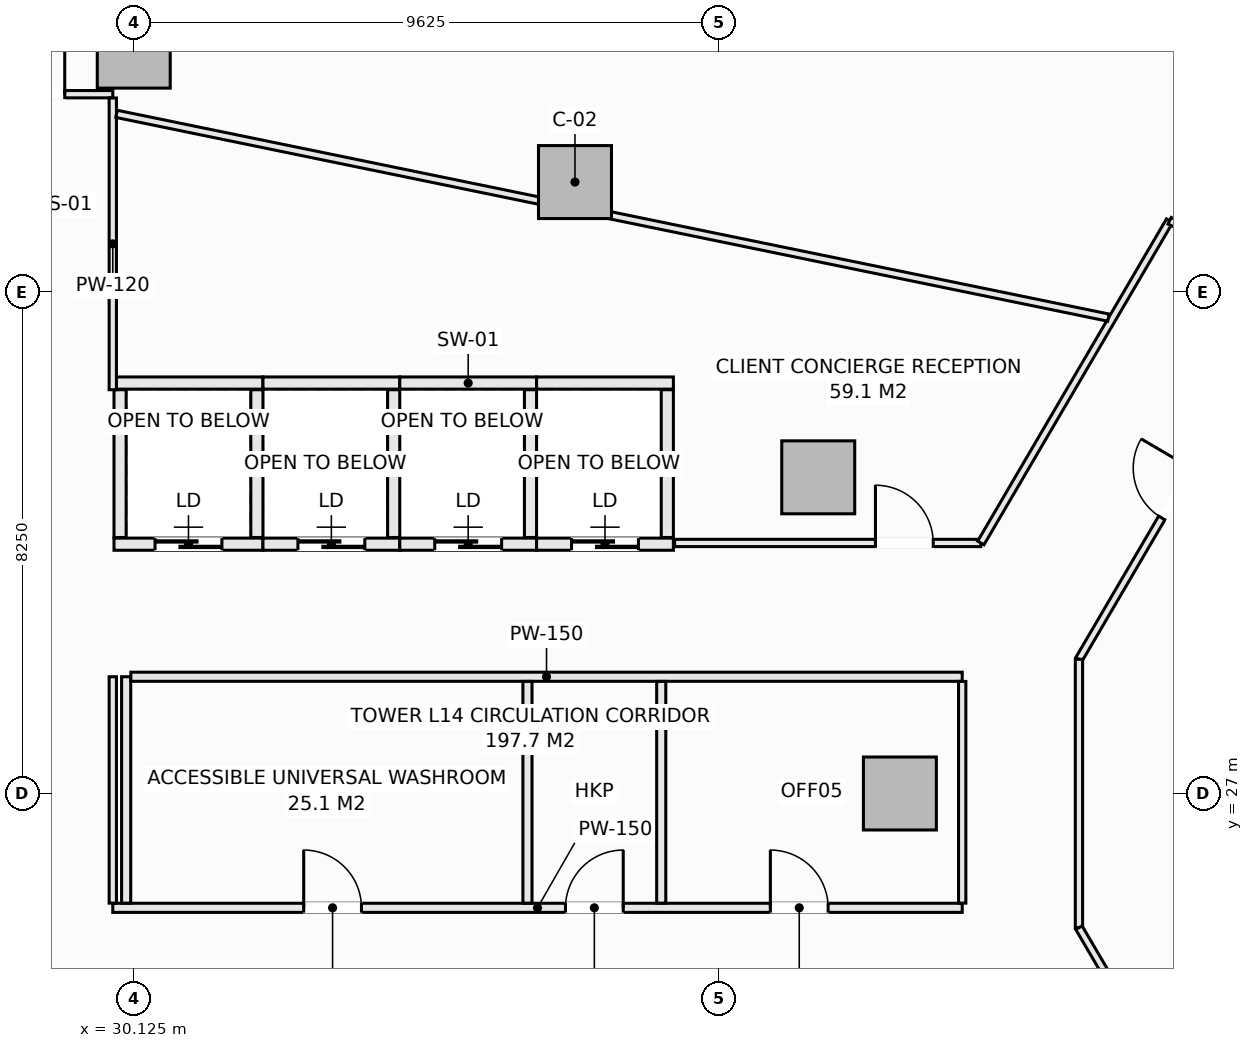
"""IFC4 building model, lengths in metres.
Left out: names, types, materials, properties, quantities, classifications, styles, units other than length and angle.
Written with IfcOpenShell. Run it as: python <this file> out.ifc"""

import sys

from ifc_helpers import new_model, si_unit, direction, frame, frame_2d, origin, origin_2d, place, context, subcontext, project, spatial, rectangle, extrude, element, fill, save


model = new_model("IFC4")
c1 = context("Model", 3, precision=1e-05, world=origin(), true_north=direction((0.0, 1.0)))
c2 = subcontext(c1, "Body", "Model", "MODEL_VIEW")
j1 = project(units=[si_unit("LENGTHUNIT", "METRE"), si_unit("PLANEANGLEUNIT", "RADIAN")], contexts=[c1])
p1 = place(None, origin())
s1 = spatial("IfcSite", under=j1, at=p1, CompositionType="ELEMENT")
p2 = place(p1, origin())
s2 = spatial("IfcBuilding", under=s1, at=p2, CompositionType="ELEMENT")
p3 = place(p2, frame((0.0, 0.0, 61.15)))
s3 = spatial("IfcBuildingStorey", under=s2, at=p3, CompositionType="ELEMENT", Elevation=61.15)
for number, where, z_axis, x_axis in (
    (1, (42.725, 27.0, -0.28), (0.0, 0.0, 1.0), (1.0, 0.0, 0.0)),
    (2, (41.382, 32.199, -0.28), (0.0, 0.0, 1.0), (1.0, 0.0, 0.0)),
    (3, (37.382, 37.055, -0.28), (0.0, 0.0, 1.0), (1.0, 0.0, 0.0)),
    (4, (30.125, 39.2, -0.28), (0.0, 0.0, 1.0), (1.0, 0.0, 0.0)),
):
    element("IfcColumn", number, at=place(p3, frame(where, z_axis=z_axis, x_axis=x_axis)), inside=s3, PredefinedType="COLUMN", context=c2, shape_type="SweptSolid", body=[
        extrude(rectangle(XDim=1.2, YDim=1.2, at=origin_2d()), origin(), (0.0, 0.0, 1.0), 3.85),
    ])
p4 = place(p3, frame((29.8, 33.75, 0.0), z_axis=(0.0, 0.0, 1.0), x_axis=(1.0, 0.0, 0.0)))
e5 = element("IfcWall", 5, at=p4, inside=s3, PredefinedType="SOLIDWALL", context=c2, shape_type="SweptSolid", body=[
    extrude(rectangle(XDim=2.45, YDim=0.2, at=frame_2d((1.225, 0.0))), origin(), (0.0, 0.0, 1.0), 3.57),
])
p5 = place(p3, frame((29.8, 31.1, 0.0), z_axis=(0.0, 0.0, 1.0), x_axis=(1.0, 0.0, 0.0)))
e6 = element("IfcWall", 6, at=p5, inside=s3, PredefinedType="SOLIDWALL", context=c2, shape_type="SweptSolid", body=[
    extrude(rectangle(XDim=2.45, YDim=0.2, at=frame_2d((1.225, 0.0))), origin(), (0.0, 0.0, 1.0), 3.57),
])
p6 = place(p5, frame((0.675, 0.0, 0.0)))
e7 = element("IfcOpeningElement", 7, at=p6, cuts=e6, PredefinedType="OPENING", context=c2, shape_type="SweptSolid", body=[
    extrude(rectangle(XDim=1.1, YDim=2.2, at=frame_2d((0.55, 1.1))), frame((0.0, 0.11, 0.0), z_axis=(0.0, -1.0, 0.0), x_axis=(1.0, 0.0, 0.0)), (0.0, 0.0, 1.0), 0.22),
])
for number, where, z_axis, x_axis in (
    (8, (29.9, 31.21, 0.0), (0.0, 0.0, 1.0), (0.0, 1.0, 0.0)),
    (9, (32.15, 31.21, 0.0), (0.0, 0.0, 1.0), (0.0, 1.0, 0.0)),
):
    element("IfcWall", number, at=place(p3, frame(where, z_axis=z_axis, x_axis=x_axis)), inside=s3, PredefinedType="SOLIDWALL", context=c2, shape_type="SweptSolid", body=[
        extrude(rectangle(XDim=2.43, YDim=0.2, at=frame_2d((1.215, 0.0))), origin(), (0.0, 0.0, 1.0), 3.57),
    ])
p7 = place(p3, frame((32.25, 33.75, 0.0), z_axis=(0.0, 0.0, 1.0), x_axis=(1.0, 0.0, 0.0)))
e10 = element("IfcWall", 10, at=p7, inside=s3, PredefinedType="SOLIDWALL", context=c2, shape_type="SweptSolid", body=[
    extrude(rectangle(XDim=2.25, YDim=0.2, at=frame_2d((1.125, 0.0))), origin(), (0.0, 0.0, 1.0), 3.57),
])
p8 = place(p3, frame((32.25, 31.1, 0.0), z_axis=(0.0, 0.0, 1.0), x_axis=(1.0, 0.0, 0.0)))
e11 = element("IfcWall", 11, at=p8, inside=s3, PredefinedType="SOLIDWALL", context=c2, shape_type="SweptSolid", body=[
    extrude(rectangle(XDim=2.25, YDim=0.2, at=frame_2d((1.125, 0.0))), origin(), (0.0, 0.0, 1.0), 3.57),
])
p9 = place(p8, frame((0.575, 0.0, 0.0)))
e12 = element("IfcOpeningElement", 12, at=p9, cuts=e11, PredefinedType="OPENING", context=c2, shape_type="SweptSolid", body=[
    extrude(rectangle(XDim=1.1, YDim=2.2, at=frame_2d((0.55, 1.1))), frame((0.0, 0.11, 0.0), z_axis=(0.0, -1.0, 0.0), x_axis=(1.0, 0.0, 0.0)), (0.0, 0.0, 1.0), 0.22),
])
p10 = place(p3, frame((34.4, 31.21, 0.0), z_axis=(0.0, 0.0, 1.0), x_axis=(0.0, 1.0, 0.0)))
e13 = element("IfcWall", 13, at=p10, inside=s3, PredefinedType="SOLIDWALL", context=c2, shape_type="SweptSolid", body=[
    extrude(rectangle(XDim=2.43, YDim=0.2, at=frame_2d((1.215, 0.0))), origin(), (0.0, 0.0, 1.0), 3.57),
])
p11 = place(p3, frame((34.5, 33.75, 0.0), z_axis=(0.0, 0.0, 1.0), x_axis=(1.0, 0.0, 0.0)))
e14 = element("IfcWall", 14, at=p11, inside=s3, PredefinedType="SOLIDWALL", context=c2, shape_type="SweptSolid", body=[
    extrude(rectangle(XDim=2.25, YDim=0.2, at=frame_2d((1.125, 0.0))), origin(), (0.0, 0.0, 1.0), 3.57),
])
p12 = place(p3, frame((34.5, 31.1, 0.0), z_axis=(0.0, 0.0, 1.0), x_axis=(1.0, 0.0, 0.0)))
e15 = element("IfcWall", 15, at=p12, inside=s3, PredefinedType="SOLIDWALL", context=c2, shape_type="SweptSolid", body=[
    extrude(rectangle(XDim=2.25, YDim=0.2, at=frame_2d((1.125, 0.0))), origin(), (0.0, 0.0, 1.0), 3.57),
])
p13 = place(p12, frame((0.575, 0.0, 0.0)))
e16 = element("IfcOpeningElement", 16, at=p13, cuts=e15, PredefinedType="OPENING", context=c2, shape_type="SweptSolid", body=[
    extrude(rectangle(XDim=1.1, YDim=2.2, at=frame_2d((0.55, 1.1))), frame((0.0, 0.11, 0.0), z_axis=(0.0, -1.0, 0.0), x_axis=(1.0, 0.0, 0.0)), (0.0, 0.0, 1.0), 0.22),
])
p14 = place(p3, frame((36.65, 31.21, 0.0), z_axis=(0.0, 0.0, 1.0), x_axis=(0.0, 1.0, 0.0)))
e17 = element("IfcWall", 17, at=p14, inside=s3, PredefinedType="SOLIDWALL", context=c2, shape_type="SweptSolid", body=[
    extrude(rectangle(XDim=2.43, YDim=0.2, at=frame_2d((1.215, 0.0))), origin(), (0.0, 0.0, 1.0), 3.57),
])
p15 = place(p3, frame((36.75, 33.75, 0.0), z_axis=(0.0, 0.0, 1.0), x_axis=(1.0, 0.0, 0.0)))
e18 = element("IfcWall", 18, at=p15, inside=s3, PredefinedType="SOLIDWALL", context=c2, shape_type="SweptSolid", body=[
    extrude(rectangle(XDim=2.25, YDim=0.2, at=frame_2d((1.125, 0.0))), origin(), (0.0, 0.0, 1.0), 3.57),
])
p16 = place(p3, frame((36.75, 31.1, 0.0), z_axis=(0.0, 0.0, 1.0), x_axis=(1.0, 0.0, 0.0)))
e19 = element("IfcWall", 19, at=p16, inside=s3, PredefinedType="SOLIDWALL", context=c2, shape_type="SweptSolid", body=[
    extrude(rectangle(XDim=2.25, YDim=0.2, at=frame_2d((1.125, 0.0))), origin(), (0.0, 0.0, 1.0), 3.57),
])
p17 = place(p16, frame((0.575, 0.0, 0.0)))
e20 = element("IfcOpeningElement", 20, at=p17, cuts=e19, PredefinedType="OPENING", context=c2, shape_type="SweptSolid", body=[
    extrude(rectangle(XDim=1.1, YDim=2.2, at=frame_2d((0.55, 1.1))), frame((0.0, 0.11, 0.0), z_axis=(0.0, -1.0, 0.0), x_axis=(1.0, 0.0, 0.0)), (0.0, 0.0, 1.0), 0.22),
])
p18 = place(p3, frame((38.9, 31.21, 0.0), z_axis=(0.0, 0.0, 1.0), x_axis=(0.0, 1.0, 0.0)))
e21 = element("IfcWall", 21, at=p18, inside=s3, PredefinedType="SOLIDWALL", context=c2, shape_type="SweptSolid", body=[
    extrude(rectangle(XDim=2.43, YDim=0.2, at=frame_2d((1.215, 0.0))), origin(), (0.0, 0.0, 1.0), 3.57),
])
p19 = place(p3, frame((29.78, 25.12, 0.0), z_axis=(0.0, 0.0, 1.0), x_axis=(1.0, 0.0, 0.0)))
e22 = element("IfcWall", 22, at=p19, inside=s3, PredefinedType="PARTITIONING", context=c2, shape_type="SweptSolid", body=[
    extrude(rectangle(XDim=13.97, YDim=0.15, at=frame_2d((6.985, 0.0))), origin(), (0.0, 0.0, 1.0), 3.57),
])
p20 = place(p19, frame((3.14, 0.0, 0.0)))
e23 = element("IfcOpeningElement", 23, at=p20, cuts=e22, PredefinedType="OPENING", context=c2, shape_type="SweptSolid", body=[
    extrude(rectangle(XDim=0.95, YDim=2.1, at=frame_2d((0.475, 1.05))), frame((0.0, 0.085, 0.0), z_axis=(0.0, -1.0, 0.0), x_axis=(1.0, 0.0, 0.0)), (0.0, 0.0, 1.0), 0.17),
])
p21 = place(p19, frame((7.445, 0.0, 0.0)))
e24 = element("IfcOpeningElement", 24, at=p21, cuts=e22, PredefinedType="OPENING", context=c2, shape_type="SweptSolid", body=[
    extrude(rectangle(XDim=0.95, YDim=2.1, at=frame_2d((0.475, 1.05))), frame((0.0, 0.085, 0.0), z_axis=(0.0, -1.0, 0.0), x_axis=(1.0, 0.0, 0.0)), (0.0, 0.0, 1.0), 0.17),
])
p22 = place(p19, frame((10.815, 0.0, 0.0)))
e25 = element("IfcOpeningElement", 25, at=p22, cuts=e22, PredefinedType="OPENING", context=c2, shape_type="SweptSolid", body=[
    extrude(rectangle(XDim=0.95, YDim=2.1, at=frame_2d((0.475, 1.05))), frame((0.0, 0.085, 0.0), z_axis=(0.0, -1.0, 0.0), x_axis=(1.0, 0.0, 0.0)), (0.0, 0.0, 1.0), 0.17),
])
p23 = place(p3, frame((30.0, 25.197, 0.0), z_axis=(0.0, 0.0, 1.0), x_axis=(0.0, 1.0, 0.0)))
e26 = element("IfcWall", 26, at=p23, inside=s3, PredefinedType="PARTITIONING", context=c2, shape_type="SweptSolid", body=[
    extrude(rectangle(XDim=3.723, YDim=0.15, at=frame_2d((1.861, 0.0))), origin(), (0.0, 0.0, 1.0), 3.57),
])
p24 = place(p3, frame((30.077, 28.92, 0.0), z_axis=(0.0, 0.0, 1.0), x_axis=(1.0, 0.0, 0.0)))
e27 = element("IfcWall", 27, at=p24, inside=s3, PredefinedType="PARTITIONING", context=c2, shape_type="SweptSolid", body=[
    extrude(rectangle(XDim=13.673, YDim=0.15, at=frame_2d((6.836, 0.0))), origin(), (0.0, 0.0, 1.0), 3.57),
])
for number, where, z_axis, x_axis in (
    (28, (36.6, 25.197, 0.0), (0.0, 0.0, 1.0), (0.0, 1.0, 0.0)),
    (29, (38.8, 25.197, 0.0), (0.0, 0.0, 1.0), (0.0, 1.0, 0.0)),
):
    element("IfcWall", number, at=place(p3, frame(where, z_axis=z_axis, x_axis=x_axis)), inside=s3, PredefinedType="PARTITIONING", context=c2, shape_type="SweptSolid", body=[
        extrude(rectangle(XDim=3.646, YDim=0.15, at=frame_2d((1.823, 0.0))), origin(), (0.0, 0.0, 1.0), 3.57),
    ])
p25 = place(p3, frame((27.25, 38.5, 0.0), z_axis=(0.0, 0.0, 1.0), x_axis=(1.0, 0.0, 0.0)))
e30 = element("IfcWall", 30, at=p25, inside=s3, PredefinedType="PARTITIONING", context=c2, shape_type="SweptSolid", body=[
    extrude(rectangle(XDim=2.53, YDim=0.12, at=frame_2d((1.265, 0.0))), origin(), (0.0, 0.0, 1.0), 3.57),
])
p26 = place(p25, frame((0.79, 0.0, 0.0)))
e31 = element("IfcOpeningElement", 31, at=p26, cuts=e30, PredefinedType="OPENING", context=c2, shape_type="SweptSolid", body=[
    extrude(rectangle(XDim=0.95, YDim=2.1, at=frame_2d((0.475, 1.05))), frame((0.0, 0.07, 0.0), z_axis=(0.0, -1.0, 0.0), x_axis=(1.0, 0.0, 0.0)), (0.0, 0.0, 1.0), 0.14),
])
p27 = place(p3, frame((29.78, 25.197, 0.0), z_axis=(0.0, 0.0, 1.0), x_axis=(0.0, 1.0, 0.0)))
e32 = element("IfcWall", 32, at=p27, inside=s3, PredefinedType="PARTITIONING", context=c2, shape_type="SweptSolid", body=[
    extrude(rectangle(XDim=3.723, YDim=0.12, at=frame_2d((1.861, 0.0))), origin(), (0.0, 0.0, 1.0), 3.57),
])
p28 = place(p3, frame((29.78, 33.64, 0.0), z_axis=(0.0, 0.0, 1.0), x_axis=(0.0, 1.0, 0.0)))
e33 = element("IfcWall", 33, at=p28, inside=s3, PredefinedType="PARTITIONING", context=c2, shape_type="SweptSolid", body=[
    extrude(rectangle(XDim=4.798, YDim=0.12, at=frame_2d((2.399, 0.0))), origin(), (0.0, 0.0, 1.0), 3.57),
])
p29 = place(p3, frame((39.02, 31.12, 0.0), z_axis=(0.0, 0.0, 1.0), x_axis=(1.0, 0.0, 0.0)))
e34 = element("IfcWall", 34, at=p29, inside=s3, PredefinedType="PARTITIONING", context=c2, shape_type="SweptSolid", body=[
    extrude(rectangle(XDim=5.036, YDim=0.12, at=frame_2d((2.518, 0.0))), origin(), (0.0, 0.0, 1.0), 3.57),
])
p30 = place(p29, frame((3.303, 0.0, 0.0)))
e35 = element("IfcOpeningElement", 35, at=p30, cuts=e34, PredefinedType="OPENING", context=c2, shape_type="SweptSolid", body=[
    extrude(rectangle(XDim=0.95, YDim=2.1, at=frame_2d((0.475, 1.05))), frame((0.0, 0.07, 0.0), z_axis=(0.0, -1.0, 0.0), x_axis=(1.0, 0.0, 0.0)), (0.0, 0.0, 1.0), 0.14),
])
p31 = place(p3, frame((44.056, 31.12, 0.0), z_axis=(0.0, 0.0, 1.0), x_axis=(0.505570543943, 0.86278527172, 0.0)))
e36 = element("IfcWall", 36, at=p31, inside=s3, PredefinedType="PARTITIONING", context=c2, shape_type="SweptSolid", body=[
    extrude(rectangle(XDim=6.142, YDim=0.12, at=frame_2d((3.071, 0.0))), origin(), (0.0, 0.0, 1.0), 3.205),
])
p32 = place(p3, frame((47.161, 36.419, 0.0), z_axis=(0.0, 0.0, 1.0), x_axis=(0.901268684569, -0.433260612351, 0.0)))
e37 = element("IfcWall", 37, at=p32, inside=s3, PredefinedType="PARTITIONING", context=c2, shape_type="SweptSolid", body=[
    extrude(rectangle(XDim=2.368, YDim=0.12, at=frame_2d((1.184, 0.0))), origin(), (0.0, 0.0, 1.0), 3.57),
])
p33 = place(p3, frame((45.67, 29.207, 0.0), z_axis=(0.0, 0.0, 1.0), x_axis=(0.505582857323, 0.86277805627, 0.0)))
e38 = element("IfcWall", 38, at=p33, inside=s3, PredefinedType="PARTITIONING", context=c2, shape_type="SweptSolid", body=[
    extrude(rectangle(XDim=7.108, YDim=0.12, at=frame_2d((3.554, 0.0))), origin(), (0.0, 0.0, 1.0), 3.57),
])
p34 = place(p33, frame((2.695, 0.0, 0.0)))
e39 = element("IfcOpeningElement", 39, at=p34, cuts=e38, PredefinedType="OPENING", context=c2, shape_type="SweptSolid", body=[
    extrude(rectangle(XDim=0.95, YDim=2.1, at=frame_2d((0.475, 1.05))), frame((0.0, 0.07, 0.0), z_axis=(0.0, -1.0, 0.0), x_axis=(1.0, 0.0, 0.0)), (0.0, 0.0, 1.0), 0.14),
])
p35 = place(p3, frame((45.67, 24.793, 0.0), z_axis=(0.0, 0.0, 1.0), x_axis=(0.0, 1.0, 0.0)))
e40 = element("IfcWall", 40, at=p35, inside=s3, PredefinedType="PARTITIONING", context=c2, shape_type="SweptSolid", body=[
    extrude(rectangle(XDim=4.414, YDim=0.12, at=frame_2d((2.207, 0.0))), origin(), (0.0, 0.0, 1.0), 3.57),
])
p36 = place(p3, frame((45.67, 24.793, 0.0), z_axis=(0.0, 0.0, 1.0), x_axis=(0.505584917928, -0.862776848764, 0.0)))
e41 = element("IfcWall", 41, at=p36, inside=s3, PredefinedType="PARTITIONING", context=c2, shape_type="SweptSolid", body=[
    extrude(rectangle(XDim=7.17, YDim=0.12, at=frame_2d((3.585, 0.0))), origin(), (0.0, 0.0, 1.0), 3.57),
])
p37 = place(p36, frame((5.016, 0.0, 0.0)))
e42 = element("IfcOpeningElement", 42, at=p37, cuts=e41, PredefinedType="OPENING", context=c2, shape_type="SweptSolid", body=[
    extrude(rectangle(XDim=0.95, YDim=2.1, at=frame_2d((0.475, 1.05))), frame((0.0, 0.07, 0.0), z_axis=(0.0, -1.0, 0.0), x_axis=(1.0, 0.0, 0.0)), (0.0, 0.0, 1.0), 0.14),
])
p38 = place(p3, frame((43.75, 25.197, 0.0), z_axis=(0.0, 0.0, 1.0), x_axis=(0.0, 1.0, 0.0)))
e43 = element("IfcWall", 43, at=p38, inside=s3, PredefinedType="PARTITIONING", context=c2, shape_type="SweptSolid", body=[
    extrude(rectangle(XDim=3.646, YDim=0.12, at=frame_2d((1.823, 0.0))), origin(), (0.0, 0.0, 1.0), 3.57),
])
p39 = place(p3, frame((29.842, 38.177, 0.0), z_axis=(0.0, 0.0, 1.0), x_axis=(0.979543984113, -0.201230174647, 0.0)))
e44 = element("IfcWall", 44, at=p39, inside=s3, PredefinedType="PARTITIONING", context=c2, shape_type="SweptSolid", body=[
    extrude(rectangle(XDim=16.654, YDim=0.12, at=frame_2d((8.327, 0.0))), origin(), (0.0, 0.0, 1.0), 2.934),
])
p40 = place(p6, origin())
e45 = element("IfcDoor", 45, at=p40, inside=s3, OperationType="SLIDING_TO_LEFT", PredefinedType="DOOR", context=c2, shape_type="SweptSolid", body=[
    extrude(rectangle(XDim=1.1, YDim=2.2, at=frame_2d((0.55, 1.1))), frame((0.0, 0.025, 0.0), z_axis=(0.0, -1.0, 0.0), x_axis=(1.0, 0.0, 0.0)), (0.0, 0.0, 1.0), 0.05),
])
fill(e7, e45)
p41 = place(p9, origin())
e46 = element("IfcDoor", 46, at=p41, inside=s3, OperationType="SLIDING_TO_LEFT", PredefinedType="DOOR", context=c2, shape_type="SweptSolid", body=[
    extrude(rectangle(XDim=1.1, YDim=2.2, at=frame_2d((0.55, 1.1))), frame((0.0, 0.025, 0.0), z_axis=(0.0, -1.0, 0.0), x_axis=(1.0, 0.0, 0.0)), (0.0, 0.0, 1.0), 0.05),
])
fill(e12, e46)
p42 = place(p13, origin())
e47 = element("IfcDoor", 47, at=p42, inside=s3, OperationType="SLIDING_TO_LEFT", PredefinedType="DOOR", context=c2, shape_type="SweptSolid", body=[
    extrude(rectangle(XDim=1.1, YDim=2.2, at=frame_2d((0.55, 1.1))), frame((0.0, 0.025, 0.0), z_axis=(0.0, -1.0, 0.0), x_axis=(1.0, 0.0, 0.0)), (0.0, 0.0, 1.0), 0.05),
])
fill(e16, e47)
p43 = place(p17, origin())
e48 = element("IfcDoor", 48, at=p43, inside=s3, OperationType="SLIDING_TO_LEFT", PredefinedType="DOOR", context=c2, shape_type="SweptSolid", body=[
    extrude(rectangle(XDim=1.1, YDim=2.2, at=frame_2d((0.55, 1.1))), frame((0.0, 0.025, 0.0), z_axis=(0.0, -1.0, 0.0), x_axis=(1.0, 0.0, 0.0)), (0.0, 0.0, 1.0), 0.05),
])
fill(e20, e48)
p44 = place(p20, origin())
e49 = element("IfcDoor", 49, at=p44, inside=s3, OperationType="SINGLE_SWING_LEFT", PredefinedType="DOOR", context=c2, shape_type="SweptSolid", body=[
    extrude(rectangle(XDim=0.95, YDim=2.1, at=frame_2d((0.475, 1.05))), frame((0.0, 0.025, 0.0), z_axis=(0.0, -1.0, 0.0), x_axis=(1.0, 0.0, 0.0)), (0.0, 0.0, 1.0), 0.05),
])
fill(e23, e49)
p45 = place(p21, origin())
e50 = element("IfcDoor", 50, at=p45, inside=s3, OperationType="SINGLE_SWING_RIGHT", PredefinedType="DOOR", context=c2, shape_type="SweptSolid", body=[
    extrude(rectangle(XDim=0.95, YDim=2.1, at=frame_2d((0.475, 1.05))), frame((0.0, 0.025, 0.0), z_axis=(0.0, -1.0, 0.0), x_axis=(1.0, 0.0, 0.0)), (0.0, 0.0, 1.0), 0.05),
])
fill(e24, e50)
p46 = place(p22, origin())
e51 = element("IfcDoor", 51, at=p46, inside=s3, OperationType="SINGLE_SWING_LEFT", PredefinedType="DOOR", context=c2, shape_type="SweptSolid", body=[
    extrude(rectangle(XDim=0.95, YDim=2.1, at=frame_2d((0.475, 1.05))), frame((0.0, 0.025, 0.0), z_axis=(0.0, -1.0, 0.0), x_axis=(1.0, 0.0, 0.0)), (0.0, 0.0, 1.0), 0.05),
])
fill(e25, e51)
p47 = place(p34, origin())
e52 = element("IfcDoor", 52, at=p47, inside=s3, OperationType="SINGLE_SWING_RIGHT", PredefinedType="DOOR", context=c2, shape_type="SweptSolid", body=[
    extrude(rectangle(XDim=0.95, YDim=2.1, at=frame_2d((0.475, 1.05))), frame((0.0, 0.025, 0.0), z_axis=(0.0, -1.0, 0.0), x_axis=(1.0, 0.0, 0.0)), (0.0, 0.0, 1.0), 0.05),
])
fill(e39, e52)
p48 = place(p30, origin())
e53 = element("IfcDoor", 53, at=p48, inside=s3, OperationType="SINGLE_SWING_LEFT", PredefinedType="DOOR", context=c2, shape_type="SweptSolid", body=[
    extrude(rectangle(XDim=0.95, YDim=2.1, at=frame_2d((0.475, 1.05))), frame((0.0, 0.025, 0.0), z_axis=(0.0, -1.0, 0.0), x_axis=(1.0, 0.0, 0.0)), (0.0, 0.0, 1.0), 0.05),
])
fill(e35, e53)
p49 = place(p26, origin())
e54 = element("IfcDoor", 54, at=p49, inside=s3, OperationType="SINGLE_SWING_RIGHT", PredefinedType="DOOR", context=c2, shape_type="SweptSolid", body=[
    extrude(rectangle(XDim=0.95, YDim=2.1, at=frame_2d((0.475, 1.05))), frame((0.0, 0.025, 0.0), z_axis=(0.0, -1.0, 0.0), x_axis=(1.0, 0.0, 0.0)), (0.0, 0.0, 1.0), 0.05),
])
fill(e31, e54)
save(model, sys.argv[1])
